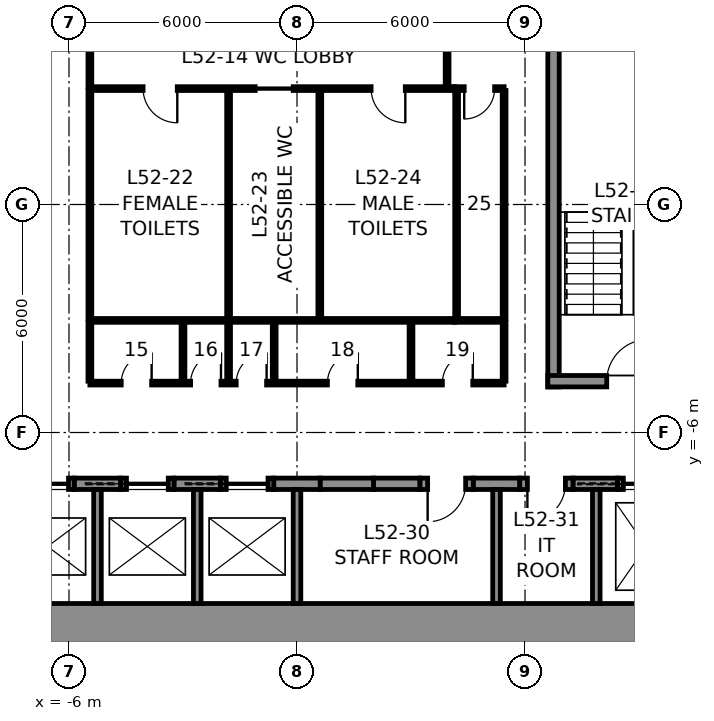
"""IFC4 building model, lengths in metres.
Left out: names, types, materials, properties, quantities, classifications, styles, units other than length and angle.
Written with IfcOpenShell. Run it as: python <this file> out.ifc"""

import sys

from ifc_helpers import new_model, si_unit, direction, frame, frame_2d, origin, place, context, subcontext, project, spatial, rectangle, extrude, element, fill, save


model = new_model("IFC4")
c1 = context("Model", 3, precision=1e-05, world=origin(), true_north=direction((0.0, 1.0)))
c2 = subcontext(c1, "Body", "Model", "MODEL_VIEW")
j1 = project(units=[si_unit("LENGTHUNIT", "METRE"), si_unit("PLANEANGLEUNIT", "RADIAN")], contexts=[c1])
p1 = place(None, origin())
s1 = spatial("IfcSite", under=j1, at=p1, CompositionType="ELEMENT")
p2 = place(p1, origin())
s2 = spatial("IfcBuilding", under=s1, at=p2, CompositionType="ELEMENT")
p3 = place(p2, frame((0.0, 0.0, 237.8)))
s3 = spatial("IfcBuildingStorey", under=s2, at=p3, CompositionType="ELEMENT", Elevation=237.8)
p4 = place(p3, frame((12.0, -11.25, 0.0), z_axis=(0.0, 0.0, 1.0), x_axis=(-1.0, 0.0, 0.0)))
e1 = element("IfcWall", 1, at=p4, inside=s3, PredefinedType="SHEAR", context=c2, shape_type="SweptSolid", body=[
    extrude(rectangle(XDim=24.0, YDim=1.5, at=frame_2d((12.0, 0.0))), origin(), (0.0, 0.0, 1.0), 4.0),
])
for number, where, z_axis, x_axis in (
    (2, (-5.863, -7.35, 0.0), (0.0, 0.0, 1.0), (1.0, 0.0, 0.0)),
    (3, (-3.238, -7.35, 0.0), (0.0, 0.0, 1.0), (1.0, 0.0, 0.0)),
    (4, (-0.613, -7.35, 0.0), (0.0, 0.0, 1.0), (1.0, 0.0, 0.0)),
    (5, (2.012, -7.35, 0.0), (0.0, 0.0, 1.0), (1.0, 0.0, 0.0)),
    (6, (4.637, -7.35, 0.0), (0.0, 0.0, 1.0), (1.0, 0.0, 0.0)),
):
    element("IfcWall", number, at=place(p3, frame(where, z_axis=z_axis, x_axis=x_axis)), inside=s3, PredefinedType="SHEAR", context=c2, shape_type="SweptSolid", body=[
        extrude(rectangle(XDim=1.225, YDim=0.3, at=frame_2d((0.613, 0.0))), origin(), (0.0, 0.0, 1.0), 4.0),
    ])
p5 = place(p3, frame((7.262, -7.35, 0.0), z_axis=(0.0, 0.0, 1.0), x_axis=(1.0, 0.0, 0.0)))
e7 = element("IfcWall", 7, at=p5, inside=s3, PredefinedType="SHEAR", context=c2, shape_type="SweptSolid", body=[
    extrude(rectangle(XDim=1.175, YDim=0.3, at=frame_2d((0.587, 0.0))), origin(), (0.0, 0.0, 1.0), 4.0),
])
p6 = place(p3, frame((-7.262, -7.35, 0.0), z_axis=(0.0, 0.0, 1.0), x_axis=(1.0, 0.0, 0.0)))
e8 = element("IfcWall", 8, at=p6, inside=s3, PredefinedType="PARTITIONING", context=c2, shape_type="SweptSolid", body=[
    extrude(rectangle(XDim=1.4, YDim=0.3, at=frame_2d((0.7, 0.0))), origin(), (0.0, 0.0, 1.0), 4.0),
])
p7 = place(p6, frame((0.15, 0.0, 0.0)))
e9 = element("IfcOpeningElement", 9, at=p7, cuts=e8, PredefinedType="OPENING", context=c2, shape_type="SweptSolid", body=[
    extrude(rectangle(XDim=1.1, YDim=2.3, at=frame_2d((0.55, 1.15))), frame((0.0, 0.16, 0.0), z_axis=(0.0, -1.0, 0.0), x_axis=(1.0, 0.0, 0.0)), (0.0, 0.0, 1.0), 0.32),
])
p8 = place(p3, frame((-4.637, -7.35, 0.0), z_axis=(0.0, 0.0, 1.0), x_axis=(1.0, 0.0, 0.0)))
e10 = element("IfcWall", 10, at=p8, inside=s3, PredefinedType="PARTITIONING", context=c2, shape_type="SweptSolid", body=[
    extrude(rectangle(XDim=1.4, YDim=0.3, at=frame_2d((0.7, 0.0))), origin(), (0.0, 0.0, 1.0), 4.0),
])
p9 = place(p8, frame((0.15, 0.0, 0.0)))
e11 = element("IfcOpeningElement", 11, at=p9, cuts=e10, PredefinedType="OPENING", context=c2, shape_type="SweptSolid", body=[
    extrude(rectangle(XDim=1.1, YDim=2.3, at=frame_2d((0.55, 1.15))), frame((0.0, 0.16, 0.0), z_axis=(0.0, -1.0, 0.0), x_axis=(1.0, 0.0, 0.0)), (0.0, 0.0, 1.0), 0.32),
])
p10 = place(p3, frame((-2.012, -7.35, 0.0), z_axis=(0.0, 0.0, 1.0), x_axis=(1.0, 0.0, 0.0)))
e12 = element("IfcWall", 12, at=p10, inside=s3, PredefinedType="PARTITIONING", context=c2, shape_type="SweptSolid", body=[
    extrude(rectangle(XDim=1.4, YDim=0.3, at=frame_2d((0.7, 0.0))), origin(), (0.0, 0.0, 1.0), 4.0),
])
p11 = place(p10, frame((0.15, 0.0, 0.0)))
e13 = element("IfcOpeningElement", 13, at=p11, cuts=e12, PredefinedType="OPENING", context=c2, shape_type="SweptSolid", body=[
    extrude(rectangle(XDim=1.1, YDim=2.3, at=frame_2d((0.55, 1.15))), frame((0.0, 0.16, 0.0), z_axis=(0.0, -1.0, 0.0), x_axis=(1.0, 0.0, 0.0)), (0.0, 0.0, 1.0), 0.32),
])
p12 = place(p3, frame((0.613, -7.35, 0.0), z_axis=(0.0, 0.0, 1.0), x_axis=(1.0, 0.0, 0.0)))
e14 = element("IfcWall", 14, at=p12, inside=s3, PredefinedType="PARTITIONING", context=c2, shape_type="SweptSolid", body=[
    extrude(rectangle(XDim=1.4, YDim=0.3, at=frame_2d((0.7, 0.0))), origin(), (0.0, 0.0, 1.0), 4.0),
])
p13 = place(p3, frame((3.238, -7.35, 0.0), z_axis=(0.0, 0.0, 1.0), x_axis=(1.0, 0.0, 0.0)))
e15 = element("IfcWall", 15, at=p13, inside=s3, PredefinedType="PARTITIONING", context=c2, shape_type="SweptSolid", body=[
    extrude(rectangle(XDim=1.4, YDim=0.3, at=frame_2d((0.7, 0.0))), origin(), (0.0, 0.0, 1.0), 4.0),
])
p14 = place(p13, frame((0.2, 0.0, 0.0)))
e16 = element("IfcOpeningElement", 16, at=p14, cuts=e15, PredefinedType="OPENING", context=c2, shape_type="SweptSolid", body=[
    extrude(rectangle(XDim=1.0, YDim=2.3, at=frame_2d((0.5, 1.15))), frame((0.0, 0.16, 0.0), z_axis=(0.0, -1.0, 0.0), x_axis=(1.0, 0.0, 0.0)), (0.0, 0.0, 1.0), 0.32),
])
p15 = place(p3, frame((5.863, -7.35, 0.0), z_axis=(0.0, 0.0, 1.0), x_axis=(1.0, 0.0, 0.0)))
e17 = element("IfcWall", 17, at=p15, inside=s3, PredefinedType="PARTITIONING", context=c2, shape_type="SweptSolid", body=[
    extrude(rectangle(XDim=1.4, YDim=0.3, at=frame_2d((0.7, 0.0))), origin(), (0.0, 0.0, 1.0), 4.0),
])
p16 = place(p15, frame((0.2, 0.0, 0.0)))
e18 = element("IfcOpeningElement", 18, at=p16, cuts=e17, PredefinedType="OPENING", context=c2, shape_type="SweptSolid", body=[
    extrude(rectangle(XDim=1.0, YDim=2.3, at=frame_2d((0.5, 1.15))), frame((0.0, 0.16, 0.0), z_axis=(0.0, -1.0, 0.0), x_axis=(1.0, 0.0, 0.0)), (0.0, 0.0, 1.0), 0.32),
])
p17 = place(p3, frame((8.438, -7.35, 0.0), z_axis=(0.0, 0.0, 1.0), x_axis=(1.0, 0.0, 0.0)))
e19 = element("IfcWall", 19, at=p17, inside=s3, PredefinedType="PARTITIONING", context=c2, shape_type="SweptSolid", body=[
    extrude(rectangle(XDim=1.5, YDim=0.3, at=frame_2d((0.75, 0.0))), origin(), (0.0, 0.0, 1.0), 4.0),
])
p18 = place(p17, frame((0.15, 0.0, 0.0)))
e20 = element("IfcOpeningElement", 20, at=p18, cuts=e19, PredefinedType="OPENING", context=c2, shape_type="SweptSolid", body=[
    extrude(rectangle(XDim=1.2, YDim=2.3, at=frame_2d((0.6, 1.15))), frame((0.0, 0.16, 0.0), z_axis=(0.0, -1.0, 0.0), x_axis=(1.0, 0.0, 0.0)), (0.0, 0.0, 1.0), 0.32),
])
for number, where, z_axis, x_axis in (
    (21, (-5.25, -10.5, 0.0), (0.0, 0.0, 1.0), (0.0, 1.0, 0.0)),
    (22, (-2.625, -10.5, 0.0), (0.0, 0.0, 1.0), (0.0, 1.0, 0.0)),
    (23, (0.0, -10.5, 0.0), (0.0, 0.0, 1.0), (0.0, 1.0, 0.0)),
    (24, (5.25, -10.5, 0.0), (0.0, 0.0, 1.0), (0.0, 1.0, 0.0)),
    (25, (7.875, -10.5, 0.0), (0.0, 0.0, 1.0), (0.0, 1.0, 0.0)),
):
    element("IfcWall", number, at=place(p3, frame(where, z_axis=z_axis, x_axis=x_axis)), inside=s3, PredefinedType="PARTITIONING", context=c2, shape_type="SweptSolid", body=[
        extrude(rectangle(XDim=3.0, YDim=0.2, at=frame_2d((1.5, 0.0))), origin(), (0.0, 0.0, 1.0), 4.0),
    ])
p19 = place(p3, frame((6.75, -4.8, 0.0), z_axis=(0.0, 0.0, 1.0), x_axis=(0.0, 1.0, 0.0)))
e26 = element("IfcWall", 26, at=p19, inside=s3, PredefinedType="SOLIDWALL", context=c2, shape_type="SweptSolid", body=[
    extrude(rectangle(XDim=9.6, YDim=0.3, at=frame_2d((4.8, 0.0))), origin(), (0.0, 0.0, 1.0), 3.75),
])
p20 = place(p3, frame((10.5, -4.65, 0.0), z_axis=(0.0, 0.0, 1.0), x_axis=(-1.0, 0.0, 0.0)))
e27 = element("IfcWall", 27, at=p20, inside=s3, PredefinedType="SOLIDWALL", context=c2, shape_type="SweptSolid", body=[
    extrude(rectangle(XDim=3.9, YDim=0.3, at=frame_2d((1.95, 0.0))), origin(), (0.0, 0.0, 1.0), 3.75),
])
p21 = place(p20, frame((1.25, 0.0, 0.0)))
e28 = element("IfcOpeningElement", 28, at=p21, cuts=e27, PredefinedType="OPENING", context=c2, shape_type="SweptSolid", body=[
    extrude(rectangle(XDim=1.1, YDim=2.3, at=frame_2d((0.55, 1.15))), frame((0.0, 0.16, 0.0), z_axis=(0.0, -1.0, 0.0), x_axis=(1.0, 0.0, 0.0)), (0.0, 0.0, 1.0), 0.32),
])
p22 = place(p3, frame((-5.45, 3.05, 0.0), z_axis=(0.0, 0.0, 1.0), x_axis=(1.0, 0.0, 0.0)))
e29 = element("IfcWall", 29, at=p22, inside=s3, PredefinedType="PARTITIONING", context=c2, shape_type="SweptSolid", body=[
    extrude(rectangle(XDim=9.6, YDim=0.1, at=frame_2d((4.8, 0.0))), origin(), (0.0, 0.0, 1.0), 3.75),
])
p23 = place(p22, frame((1.4, 0.0, 0.0)))
e30 = element("IfcOpeningElement", 30, at=p23, cuts=e29, PredefinedType="OPENING", context=c2, shape_type="SweptSolid", body=[
    extrude(rectangle(XDim=0.9, YDim=2.3, at=frame_2d((0.45, 1.15))), frame((0.0, 0.06, 0.0), z_axis=(0.0, -1.0, 0.0), x_axis=(1.0, 0.0, 0.0)), (0.0, 0.0, 1.0), 0.12),
])
p24 = place(p22, frame((4.35, 0.0, 0.0)))
e31 = element("IfcOpeningElement", 31, at=p24, cuts=e29, PredefinedType="OPENING", context=c2, shape_type="SweptSolid", body=[
    extrude(rectangle(XDim=1.0, YDim=2.3, at=frame_2d((0.5, 1.15))), frame((0.0, 0.06, 0.0), z_axis=(0.0, -1.0, 0.0), x_axis=(1.0, 0.0, 0.0)), (0.0, 0.0, 1.0), 0.12),
])
p25 = place(p22, frame((7.4, 0.0, 0.0)))
e32 = element("IfcOpeningElement", 32, at=p25, cuts=e29, PredefinedType="OPENING", context=c2, shape_type="SweptSolid", body=[
    extrude(rectangle(XDim=0.9, YDim=2.3, at=frame_2d((0.45, 1.15))), frame((0.0, 0.06, 0.0), z_axis=(0.0, -1.0, 0.0), x_axis=(1.0, 0.0, 0.0)), (0.0, 0.0, 1.0), 0.12),
])
p26 = place(p3, frame((4.15, 3.05, 0.0), z_axis=(0.0, 0.0, 1.0), x_axis=(1.0, 0.0, 0.0)))
e33 = element("IfcWall", 33, at=p26, inside=s3, PredefinedType="PARTITIONING", context=c2, shape_type="SweptSolid", body=[
    extrude(rectangle(XDim=1.3, YDim=0.1, at=frame_2d((0.65, 0.0))), origin(), (0.0, 0.0, 1.0), 3.75),
])
p27 = place(p26, frame((0.25, 0.0, 0.0)))
e34 = element("IfcOpeningElement", 34, at=p27, cuts=e33, PredefinedType="OPENING", context=c2, shape_type="SweptSolid", body=[
    extrude(rectangle(XDim=0.8, YDim=2.3, at=frame_2d((0.4, 1.15))), frame((0.0, 0.06, 0.0), z_axis=(0.0, -1.0, 0.0), x_axis=(1.0, 0.0, 0.0)), (0.0, 0.0, 1.0), 0.12),
])
p28 = place(p3, frame((4.15, -3.05, 0.0), z_axis=(0.0, 0.0, 1.0), x_axis=(-1.0, 0.0, 0.0)))
e35 = element("IfcWall", 35, at=p28, inside=s3, PredefinedType="PARTITIONING", context=c2, shape_type="SweptSolid", body=[
    extrude(rectangle(XDim=9.6, YDim=0.1, at=frame_2d((4.8, 0.0))), origin(), (0.0, 0.0, 1.0), 3.75),
])
p29 = place(p3, frame((5.45, -3.05, 0.0), z_axis=(0.0, 0.0, 1.0), x_axis=(-1.0, 0.0, 0.0)))
e36 = element("IfcWall", 36, at=p29, inside=s3, PredefinedType="PARTITIONING", context=c2, shape_type="SweptSolid", body=[
    extrude(rectangle(XDim=1.3, YDim=0.1, at=frame_2d((0.65, 0.0))), origin(), (0.0, 0.0, 1.0), 3.75),
])
for number, where, z_axis, x_axis in (
    (37, (5.45, 3.0, 0.0), (0.0, 0.0, 1.0), (0.0, -1.0, 0.0)),
    (38, (-5.45, -3.0, 0.0), (0.0, 0.0, 1.0), (0.0, 1.0, 0.0)),
    (39, (-1.8, -3.0, 0.0), (0.0, 0.0, 1.0), (0.0, 1.0, 0.0)),
    (40, (0.6, -3.0, 0.0), (0.0, 0.0, 1.0), (0.0, 1.0, 0.0)),
    (41, (4.2, -3.0, 0.0), (0.0, 0.0, 1.0), (0.0, 1.0, 0.0)),
):
    element("IfcWall", number, at=place(p3, frame(where, z_axis=z_axis, x_axis=x_axis)), inside=s3, PredefinedType="PARTITIONING", context=c2, shape_type="SweptSolid", body=[
        extrude(rectangle(XDim=6.0, YDim=0.1, at=frame_2d((3.0, 0.0))), origin(), (0.0, 0.0, 1.0), 3.75),
    ])
for number, where, z_axis, x_axis in (
    (42, (-5.45, 3.1, 0.0), (0.0, 0.0, 1.0), (0.0, 1.0, 0.0)),
    (43, (3.95, 3.1, 0.0), (0.0, 0.0, 1.0), (0.0, 1.0, 0.0)),
):
    element("IfcWall", number, at=place(p3, frame(where, z_axis=z_axis, x_axis=x_axis)), inside=s3, PredefinedType="PARTITIONING", context=c2, shape_type="SweptSolid", body=[
        extrude(rectangle(XDim=1.55, YDim=0.1, at=frame_2d((0.775, 0.0))), origin(), (0.0, 0.0, 1.0), 3.75),
    ])
p30 = place(p3, frame((5.45, -4.7, 0.0), z_axis=(0.0, 0.0, 1.0), x_axis=(-1.0, 0.0, 0.0)))
e44 = element("IfcWall", 44, at=p30, inside=s3, PredefinedType="PARTITIONING", context=c2, shape_type="SweptSolid", body=[
    extrude(rectangle(XDim=10.9, YDim=0.1, at=frame_2d((5.45, 0.0))), origin(), (0.0, 0.0, 1.0), 3.75),
])
p31 = place(p30, frame((9.275, 0.0, 0.0)))
e45 = element("IfcOpeningElement", 45, at=p31, cuts=e44, PredefinedType="OPENING", context=c2, shape_type="SweptSolid", body=[
    extrude(rectangle(XDim=0.8, YDim=2.3, at=frame_2d((0.4, 1.15))), frame((0.0, 0.06, 0.0), z_axis=(0.0, -1.0, 0.0), x_axis=(1.0, 0.0, 0.0)), (0.0, 0.0, 1.0), 0.12),
])
p32 = place(p30, frame((7.45, 0.0, 0.0)))
e46 = element("IfcOpeningElement", 46, at=p32, cuts=e44, PredefinedType="OPENING", context=c2, shape_type="SweptSolid", body=[
    extrude(rectangle(XDim=0.8, YDim=2.3, at=frame_2d((0.4, 1.15))), frame((0.0, 0.06, 0.0), z_axis=(0.0, -1.0, 0.0), x_axis=(1.0, 0.0, 0.0)), (0.0, 0.0, 1.0), 0.12),
])
p33 = place(p30, frame((6.25, 0.0, 0.0)))
e47 = element("IfcOpeningElement", 47, at=p33, cuts=e44, PredefinedType="OPENING", context=c2, shape_type="SweptSolid", body=[
    extrude(rectangle(XDim=0.8, YDim=2.3, at=frame_2d((0.4, 1.15))), frame((0.0, 0.06, 0.0), z_axis=(0.0, -1.0, 0.0), x_axis=(1.0, 0.0, 0.0)), (0.0, 0.0, 1.0), 0.12),
])
p34 = place(p30, frame((3.85, 0.0, 0.0)))
e48 = element("IfcOpeningElement", 48, at=p34, cuts=e44, PredefinedType="OPENING", context=c2, shape_type="SweptSolid", body=[
    extrude(rectangle(XDim=0.8, YDim=2.3, at=frame_2d((0.4, 1.15))), frame((0.0, 0.06, 0.0), z_axis=(0.0, -1.0, 0.0), x_axis=(1.0, 0.0, 0.0)), (0.0, 0.0, 1.0), 0.12),
])
p35 = place(p30, frame((0.825, 0.0, 0.0)))
e49 = element("IfcOpeningElement", 49, at=p35, cuts=e44, PredefinedType="OPENING", context=c2, shape_type="SweptSolid", body=[
    extrude(rectangle(XDim=0.8, YDim=2.3, at=frame_2d((0.4, 1.15))), frame((0.0, 0.06, 0.0), z_axis=(0.0, -1.0, 0.0), x_axis=(1.0, 0.0, 0.0)), (0.0, 0.0, 1.0), 0.12),
])
for number, where, z_axis, x_axis in (
    (50, (-5.45, -3.1, 0.0), (0.0, 0.0, 1.0), (0.0, -1.0, 0.0)),
    (51, (5.45, -3.1, 0.0), (0.0, 0.0, 1.0), (0.0, -1.0, 0.0)),
    (52, (-3.0, -3.1, 0.0), (0.0, 0.0, 1.0), (0.0, -1.0, 0.0)),
    (53, (-1.8, -3.1, 0.0), (0.0, 0.0, 1.0), (0.0, -1.0, 0.0)),
    (54, (-0.6, -3.1, 0.0), (0.0, 0.0, 1.0), (0.0, -1.0, 0.0)),
    (55, (3.0, -3.1, 0.0), (0.0, 0.0, 1.0), (0.0, -1.0, 0.0)),
):
    element("IfcWall", number, at=place(p3, frame(where, z_axis=z_axis, x_axis=x_axis)), inside=s3, PredefinedType="PARTITIONING", context=c2, shape_type="SweptSolid", body=[
        extrude(rectangle(XDim=1.55, YDim=0.1, at=frame_2d((0.775, 0.0))), origin(), (0.0, 0.0, 1.0), 3.75),
    ])
p36 = place(p21, frame((1.1, 0.0, 0.0), z_axis=(0.0, 0.0, 1.0), x_axis=(-1.0, 0.0, 0.0)))
e56 = element("IfcDoor", 56, at=p36, inside=s3, OperationType="SINGLE_SWING_RIGHT", PredefinedType="DOOR", context=c2, shape_type="SweptSolid", body=[
    extrude(rectangle(XDim=1.1, YDim=2.3, at=frame_2d((0.55, 1.15))), frame((0.0, 0.025, 0.0), z_axis=(0.0, -1.0, 0.0), x_axis=(1.0, 0.0, 0.0)), (0.0, 0.0, 1.0), 0.05),
])
fill(e28, e56)
p37 = place(p23, frame((0.9, 0.0, 0.0), z_axis=(0.0, 0.0, 1.0), x_axis=(-1.0, 0.0, 0.0)))
e57 = element("IfcDoor", 57, at=p37, inside=s3, OperationType="SINGLE_SWING_LEFT", PredefinedType="DOOR", context=c2, shape_type="SweptSolid", body=[
    extrude(rectangle(XDim=0.9, YDim=2.3, at=frame_2d((0.45, 1.15))), frame((0.0, 0.025, 0.0), z_axis=(0.0, -1.0, 0.0), x_axis=(1.0, 0.0, 0.0)), (0.0, 0.0, 1.0), 0.05),
])
fill(e30, e57)
p38 = place(p24, frame((1.0, 0.0, 0.0), z_axis=(0.0, 0.0, 1.0), x_axis=(-1.0, 0.0, 0.0)))
e58 = element("IfcDoor", 58, at=p38, inside=s3, OperationType="SLIDING_TO_LEFT", PredefinedType="DOOR", context=c2, shape_type="SweptSolid", body=[
    extrude(rectangle(XDim=1.0, YDim=2.3, at=frame_2d((0.5, 1.15))), frame((0.0, 0.025, 0.0), z_axis=(0.0, -1.0, 0.0), x_axis=(1.0, 0.0, 0.0)), (0.0, 0.0, 1.0), 0.05),
])
fill(e31, e58)
p39 = place(p25, frame((0.9, 0.0, 0.0), z_axis=(0.0, 0.0, 1.0), x_axis=(-1.0, 0.0, 0.0)))
e59 = element("IfcDoor", 59, at=p39, inside=s3, OperationType="SINGLE_SWING_LEFT", PredefinedType="DOOR", context=c2, shape_type="SweptSolid", body=[
    extrude(rectangle(XDim=0.9, YDim=2.3, at=frame_2d((0.45, 1.15))), frame((0.0, 0.025, 0.0), z_axis=(0.0, -1.0, 0.0), x_axis=(1.0, 0.0, 0.0)), (0.0, 0.0, 1.0), 0.05),
])
fill(e32, e59)
p40 = place(p27, frame((0.8, 0.0, 0.0), z_axis=(0.0, 0.0, 1.0), x_axis=(-1.0, 0.0, 0.0)))
e60 = element("IfcDoor", 60, at=p40, inside=s3, OperationType="SINGLE_SWING_RIGHT", PredefinedType="DOOR", context=c2, shape_type="SweptSolid", body=[
    extrude(rectangle(XDim=0.8, YDim=2.3, at=frame_2d((0.4, 1.15))), frame((0.0, 0.025, 0.0), z_axis=(0.0, -1.0, 0.0), x_axis=(1.0, 0.0, 0.0)), (0.0, 0.0, 1.0), 0.05),
])
fill(e34, e60)
p41 = place(p31, frame((0.8, 0.0, 0.0), z_axis=(0.0, 0.0, 1.0), x_axis=(-1.0, 0.0, 0.0)))
e61 = element("IfcDoor", 61, at=p41, inside=s3, OperationType="SINGLE_SWING_RIGHT", PredefinedType="DOOR", context=c2, shape_type="SweptSolid", body=[
    extrude(rectangle(XDim=0.8, YDim=2.3, at=frame_2d((0.4, 1.15))), frame((0.0, 0.025, 0.0), z_axis=(0.0, -1.0, 0.0), x_axis=(1.0, 0.0, 0.0)), (0.0, 0.0, 1.0), 0.05),
])
fill(e45, e61)
p42 = place(p32, frame((0.8, 0.0, 0.0), z_axis=(0.0, 0.0, 1.0), x_axis=(-1.0, 0.0, 0.0)))
e62 = element("IfcDoor", 62, at=p42, inside=s3, OperationType="SINGLE_SWING_RIGHT", PredefinedType="DOOR", context=c2, shape_type="SweptSolid", body=[
    extrude(rectangle(XDim=0.8, YDim=2.3, at=frame_2d((0.4, 1.15))), frame((0.0, 0.025, 0.0), z_axis=(0.0, -1.0, 0.0), x_axis=(1.0, 0.0, 0.0)), (0.0, 0.0, 1.0), 0.05),
])
fill(e46, e62)
p43 = place(p33, frame((0.8, 0.0, 0.0), z_axis=(0.0, 0.0, 1.0), x_axis=(-1.0, 0.0, 0.0)))
e63 = element("IfcDoor", 63, at=p43, inside=s3, OperationType="SINGLE_SWING_RIGHT", PredefinedType="DOOR", context=c2, shape_type="SweptSolid", body=[
    extrude(rectangle(XDim=0.8, YDim=2.3, at=frame_2d((0.4, 1.15))), frame((0.0, 0.025, 0.0), z_axis=(0.0, -1.0, 0.0), x_axis=(1.0, 0.0, 0.0)), (0.0, 0.0, 1.0), 0.05),
])
fill(e47, e63)
p44 = place(p34, frame((0.8, 0.0, 0.0), z_axis=(0.0, 0.0, 1.0), x_axis=(-1.0, 0.0, 0.0)))
e64 = element("IfcDoor", 64, at=p44, inside=s3, OperationType="SINGLE_SWING_RIGHT", PredefinedType="DOOR", context=c2, shape_type="SweptSolid", body=[
    extrude(rectangle(XDim=0.8, YDim=2.3, at=frame_2d((0.4, 1.15))), frame((0.0, 0.025, 0.0), z_axis=(0.0, -1.0, 0.0), x_axis=(1.0, 0.0, 0.0)), (0.0, 0.0, 1.0), 0.05),
])
fill(e48, e64)
p45 = place(p35, frame((0.8, 0.0, 0.0), z_axis=(0.0, 0.0, 1.0), x_axis=(-1.0, 0.0, 0.0)))
e65 = element("IfcDoor", 65, at=p45, inside=s3, OperationType="SINGLE_SWING_RIGHT", PredefinedType="DOOR", context=c2, shape_type="SweptSolid", body=[
    extrude(rectangle(XDim=0.8, YDim=2.3, at=frame_2d((0.4, 1.15))), frame((0.0, 0.025, 0.0), z_axis=(0.0, -1.0, 0.0), x_axis=(1.0, 0.0, 0.0)), (0.0, 0.0, 1.0), 0.05),
])
fill(e49, e65)
p46 = place(p14, frame((1.0, 0.0, 0.0), z_axis=(0.0, 0.0, 1.0), x_axis=(-1.0, 0.0, 0.0)))
e66 = element("IfcDoor", 66, at=p46, inside=s3, OperationType="SINGLE_SWING_RIGHT", PredefinedType="DOOR", context=c2, shape_type="SweptSolid", body=[
    extrude(rectangle(XDim=1.0, YDim=2.3, at=frame_2d((0.5, 1.15))), frame((0.0, 0.025, 0.0), z_axis=(0.0, -1.0, 0.0), x_axis=(1.0, 0.0, 0.0)), (0.0, 0.0, 1.0), 0.05),
])
fill(e16, e66)
p47 = place(p16, frame((1.0, 0.0, 0.0), z_axis=(0.0, 0.0, 1.0), x_axis=(-1.0, 0.0, 0.0)))
e67 = element("IfcDoor", 67, at=p47, inside=s3, OperationType="SINGLE_SWING_RIGHT", PredefinedType="DOOR", context=c2, shape_type="SweptSolid", body=[
    extrude(rectangle(XDim=1.0, YDim=2.3, at=frame_2d((0.5, 1.15))), frame((0.0, 0.025, 0.0), z_axis=(0.0, -1.0, 0.0), x_axis=(1.0, 0.0, 0.0)), (0.0, 0.0, 1.0), 0.05),
])
fill(e18, e67)
p48 = place(p18, origin())
e68 = element("IfcDoor", 68, at=p48, inside=s3, OperationType="SLIDING_TO_LEFT", PredefinedType="DOOR", context=c2, shape_type="SweptSolid", body=[
    extrude(rectangle(XDim=1.2, YDim=2.3, at=frame_2d((0.6, 1.15))), frame((0.0, 0.025, 0.0), z_axis=(0.0, -1.0, 0.0), x_axis=(1.0, 0.0, 0.0)), (0.0, 0.0, 1.0), 0.05),
])
fill(e20, e68)
p49 = place(p11, origin())
e69 = element("IfcDoor", 69, at=p49, inside=s3, OperationType="SLIDING_TO_LEFT", PredefinedType="DOOR", context=c2, shape_type="SweptSolid", body=[
    extrude(rectangle(XDim=1.1, YDim=2.3, at=frame_2d((0.55, 1.15))), frame((0.0, 0.025, 0.0), z_axis=(0.0, -1.0, 0.0), x_axis=(1.0, 0.0, 0.0)), (0.0, 0.0, 1.0), 0.05),
])
fill(e13, e69)
p50 = place(p9, origin())
e70 = element("IfcDoor", 70, at=p50, inside=s3, OperationType="SLIDING_TO_LEFT", PredefinedType="DOOR", context=c2, shape_type="SweptSolid", body=[
    extrude(rectangle(XDim=1.1, YDim=2.3, at=frame_2d((0.55, 1.15))), frame((0.0, 0.025, 0.0), z_axis=(0.0, -1.0, 0.0), x_axis=(1.0, 0.0, 0.0)), (0.0, 0.0, 1.0), 0.05),
])
fill(e11, e70)
p51 = place(p7, origin())
e71 = element("IfcDoor", 71, at=p51, inside=s3, OperationType="SLIDING_TO_LEFT", PredefinedType="DOOR", context=c2, shape_type="SweptSolid", body=[
    extrude(rectangle(XDim=1.1, YDim=2.3, at=frame_2d((0.55, 1.15))), frame((0.0, 0.025, 0.0), z_axis=(0.0, -1.0, 0.0), x_axis=(1.0, 0.0, 0.0)), (0.0, 0.0, 1.0), 0.05),
])
fill(e9, e71)
save(model, sys.argv[1])
